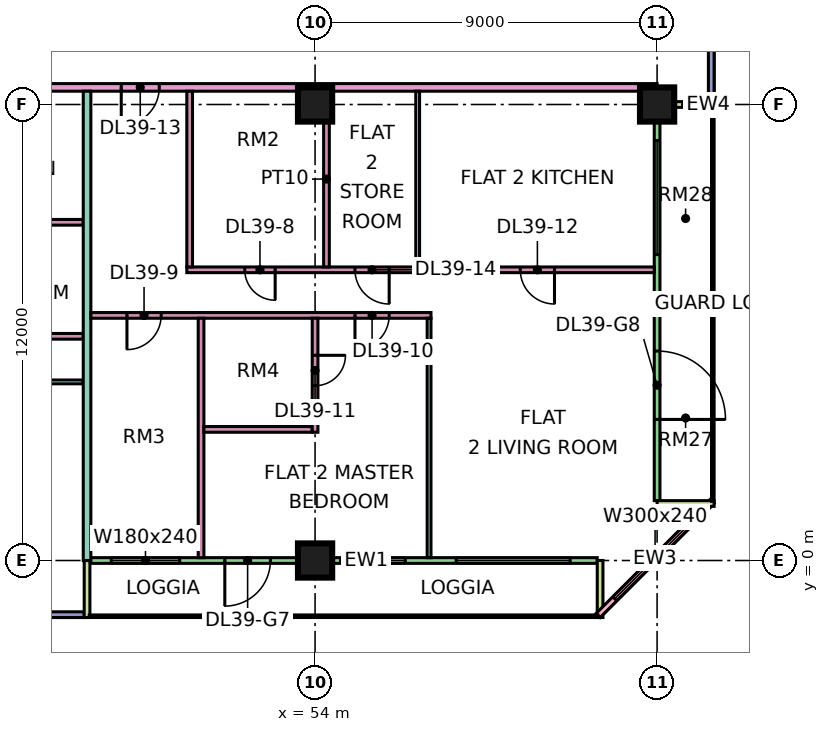
"""IFC4 building model, lengths in metres.
Left out: names, types, materials, properties, quantities, classifications, styles, units other than length and angle.
Written with IfcOpenShell. Run it as: python <this file> out.ifc"""

import sys

from ifc_helpers import new_model, si_unit, direction, frame, frame_2d, origin, origin_2d, place, context, subcontext, project, spatial, rectangle, extrude, element, fill, save


model = new_model("IFC4")
c1 = context("Model", 3, precision=1e-05, world=origin(), true_north=direction((0.0, 1.0)))
c2 = subcontext(c1, "Body", "Model", "MODEL_VIEW")
j1 = project(units=[si_unit("LENGTHUNIT", "METRE"), si_unit("PLANEANGLEUNIT", "RADIAN")], contexts=[c1])
p1 = place(None, origin())
s1 = spatial("IfcSite", under=j1, at=p1, CompositionType="ELEMENT")
p2 = place(p1, origin())
s2 = spatial("IfcBuilding", under=s1, at=p2, CompositionType="ELEMENT")
p3 = place(p2, frame((0.0, 0.0, 172.4)))
s3 = spatial("IfcBuildingStorey", under=s2, at=p3, CompositionType="ELEMENT", Elevation=172.4)
for number, where, z_axis, x_axis in (
    (1, (54.0, 0.0, 0.0), (0.0, 0.0, 1.0), (1.0, 0.0, 0.0)),
    (2, (54.0, 12.0, 0.0), (0.0, 0.0, 1.0), (1.0, 0.0, 0.0)),
    (3, (63.0, 12.0, 0.0), (0.0, 0.0, 1.0), (1.0, 0.0, 0.0)),
):
    element("IfcColumn", number, at=place(p3, frame(where, z_axis=z_axis, x_axis=x_axis)), inside=s3, PredefinedType="COLUMN", context=c2, shape_type="SweptSolid", body=[
        extrude(rectangle(XDim=0.9, YDim=0.9, at=origin_2d()), origin(), (0.0, 0.0, 1.0), 3.75),
    ])
p4 = place(p3, frame((36.075, -1.425, 0.0), z_axis=(0.0, 0.0, 1.0), x_axis=(1.0, 0.0, 0.0)))
e4 = element("IfcWall", 4, at=p4, inside=s3, PredefinedType="SOLIDWALL", context=c2, shape_type="SweptSolid", body=[
    extrude(rectangle(XDim=11.85, YDim=0.15, at=frame_2d((5.925, 0.0))), origin(), (0.0, 0.0, 1.0), 3.35),
])
p5 = place(p4, frame((0.562, 0.0, 0.45)))
e5 = element("IfcOpeningElement", 5, at=p5, cuts=e4, PredefinedType="OPENING", context=c2, shape_type="SweptSolid", body=[
    extrude(rectangle(XDim=1.8, YDim=2.4, at=frame_2d((0.9, 1.2))), frame((0.0, 0.085, 0.0), z_axis=(0.0, -1.0, 0.0), x_axis=(1.0, 0.0, 0.0)), (0.0, 0.0, 1.0), 0.17),
])
p6 = place(p4, frame((5.887, 0.0, 0.45)))
e6 = element("IfcOpeningElement", 6, at=p6, cuts=e4, PredefinedType="OPENING", context=c2, shape_type="SweptSolid", body=[
    extrude(rectangle(XDim=3.0, YDim=2.4, at=frame_2d((1.5, 1.2))), frame((0.0, 0.085, 0.0), z_axis=(0.0, -1.0, 0.0), x_axis=(1.0, 0.0, 0.0)), (0.0, 0.0, 1.0), 0.17),
])
p7 = place(p3, frame((48.075, 0.0, 0.0), z_axis=(0.0, 0.0, 1.0), x_axis=(1.0, 0.0, 0.0)))
e7 = element("IfcWall", 7, at=p7, inside=s3, PredefinedType="SOLIDWALL", context=c2, shape_type="SweptSolid", body=[
    extrude(rectangle(XDim=13.35, YDim=0.15, at=frame_2d((6.675, 0.0))), origin(), (0.0, 0.0, 1.0), 3.35),
])
p8 = place(p7, frame((0.562, 0.0, 0.45)))
e8 = element("IfcOpeningElement", 8, at=p8, cuts=e7, PredefinedType="OPENING", context=c2, shape_type="SweptSolid", body=[
    extrude(rectangle(XDim=1.8, YDim=2.4, at=frame_2d((0.9, 1.2))), frame((0.0, 0.085, 0.0), z_axis=(0.0, -1.0, 0.0), x_axis=(1.0, 0.0, 0.0)), (0.0, 0.0, 1.0), 0.17),
])
p9 = place(p7, frame((3.55, 0.0, 0.0)))
e9 = element("IfcOpeningElement", 9, at=p9, cuts=e7, PredefinedType="OPENING", context=c2, shape_type="SweptSolid", body=[
    extrude(rectangle(XDim=1.2, YDim=2.4, at=frame_2d((0.6, 1.2))), frame((0.0, 0.085, 0.0), z_axis=(0.0, -1.0, 0.0), x_axis=(1.0, 0.0, 0.0)), (0.0, 0.0, 1.0), 0.17),
])
p10 = place(p7, frame((7.1, 0.0, 0.45)))
e10 = element("IfcOpeningElement", 10, at=p10, cuts=e7, PredefinedType="OPENING", context=c2, shape_type="SweptSolid", body=[
    extrude(rectangle(XDim=1.2, YDim=2.4, at=frame_2d((0.6, 1.2))), frame((0.0, 0.085, 0.0), z_axis=(0.0, -1.0, 0.0), x_axis=(1.0, 0.0, 0.0)), (0.0, 0.0, 1.0), 0.17),
])
p11 = place(p7, frame((9.637, 0.0, 0.45)))
e11 = element("IfcOpeningElement", 11, at=p11, cuts=e7, PredefinedType="OPENING", context=c2, shape_type="SweptSolid", body=[
    extrude(rectangle(XDim=3.0, YDim=2.4, at=frame_2d((1.5, 1.2))), frame((0.0, 0.085, 0.0), z_axis=(0.0, -1.0, 0.0), x_axis=(1.0, 0.0, 0.0)), (0.0, 0.0, 1.0), 0.17),
])
for number, where, z_axis, x_axis in (
    (12, (48.0, -1.5, 0.0), (0.0, 0.0, 1.0), (0.0, 1.0, 0.0)),
    (13, (61.5, -1.5, 0.0), (0.0, 0.0, 1.0), (0.0, 1.0, 0.0)),
):
    element("IfcWall", number, at=place(p3, frame(where, z_axis=z_axis, x_axis=x_axis)), inside=s3, PredefinedType="SOLIDWALL", context=c2, shape_type="SweptSolid", body=[
        extrude(rectangle(XDim=1.5, YDim=0.15, at=frame_2d((0.75, 0.0))), origin(), (0.0, 0.0, 1.0), 3.35),
    ])
p12 = place(p3, frame((61.447, -1.447, 0.0), z_axis=(0.0, 0.0, 1.0), x_axis=(0.707106781187, 0.707106781187, 0.0)))
e14 = element("IfcWall", 14, at=p12, inside=s3, PredefinedType="SOLIDWALL", context=c2, shape_type="SweptSolid", body=[
    extrude(rectangle(XDim=4.243, YDim=0.15, at=frame_2d((2.121, 0.0))), origin(), (0.0, 0.0, 1.0), 3.35),
])
p13 = place(p12, frame((0.621, 0.0, 0.45)))
e15 = element("IfcOpeningElement", 15, at=p13, cuts=e14, PredefinedType="OPENING", context=c2, shape_type="SweptSolid", body=[
    extrude(rectangle(XDim=3.0, YDim=2.4, at=frame_2d((1.5, 1.2))), frame((0.0, 0.085, 0.0), z_axis=(0.0, -1.0, 0.0), x_axis=(1.0, 0.0, 0.0)), (0.0, 0.0, 1.0), 0.17),
])
p14 = place(p3, frame((63.0, 1.575, 0.0), z_axis=(0.0, 0.0, 1.0), x_axis=(0.0, 1.0, 0.0)))
e16 = element("IfcWall", 16, at=p14, inside=s3, PredefinedType="SOLIDWALL", context=c2, shape_type="SweptSolid", body=[
    extrude(rectangle(XDim=10.35, YDim=0.15, at=frame_2d((5.175, 0.0))), origin(), (0.0, 0.0, 1.0), 3.35),
])
p15 = place(p14, frame((2.137, 0.0, 0.0)))
e17 = element("IfcOpeningElement", 17, at=p15, cuts=e16, PredefinedType="OPENING", context=c2, shape_type="SweptSolid", body=[
    extrude(rectangle(XDim=1.8, YDim=2.4, at=frame_2d((0.9, 1.2))), frame((0.0, 0.085, 0.0), z_axis=(0.0, -1.0, 0.0), x_axis=(1.0, 0.0, 0.0)), (0.0, 0.0, 1.0), 0.17),
])
p16 = place(p14, frame((6.475, 0.0, 0.45)))
e18 = element("IfcOpeningElement", 18, at=p16, cuts=e16, PredefinedType="OPENING", context=c2, shape_type="SweptSolid", body=[
    extrude(rectangle(XDim=3.0, YDim=2.4, at=frame_2d((1.5, 1.2))), frame((0.0, 0.085, 0.0), z_axis=(0.0, -1.0, 0.0), x_axis=(1.0, 0.0, 0.0)), (0.0, 0.0, 1.0), 0.17),
])
for number, where, z_axis, x_axis in (
    (19, (64.5, 1.5, 0.0), (0.0, 0.0, 1.0), (-1.0, 0.0, 0.0)),
    (20, (64.5, 12.0, 0.0), (0.0, 0.0, 1.0), (-1.0, 0.0, 0.0)),
):
    element("IfcWall", number, at=place(p3, frame(where, z_axis=z_axis, x_axis=x_axis)), inside=s3, PredefinedType="SOLIDWALL", context=c2, shape_type="SweptSolid", body=[
        extrude(rectangle(XDim=1.5, YDim=0.15, at=frame_2d((0.75, 0.0))), origin(), (0.0, 0.0, 1.0), 3.35),
    ])
p17 = place(p3, frame((64.425, 12.075, 0.0), z_axis=(0.0, 0.0, 1.0), x_axis=(0.0, 1.0, 0.0)))
e21 = element("IfcWall", 21, at=p17, inside=s3, PredefinedType="SOLIDWALL", context=c2, shape_type="SweptSolid", body=[
    extrude(rectangle(XDim=10.425, YDim=0.15, at=frame_2d((5.212, 0.0))), origin(), (0.0, 0.0, 1.0), 3.35),
])
p18 = place(p17, frame((6.375, 0.0, 0.45)))
e22 = element("IfcOpeningElement", 22, at=p18, cuts=e21, PredefinedType="OPENING", context=c2, shape_type="SweptSolid", body=[
    extrude(rectangle(XDim=0.9, YDim=2.4, at=frame_2d((0.45, 1.2))), frame((0.0, 0.085, 0.0), z_axis=(0.0, -1.0, 0.0), x_axis=(1.0, 0.0, 0.0)), (0.0, 0.0, 1.0), 0.17),
])
p19 = place(p17, frame((8.175, 0.0, 0.45)))
e23 = element("IfcOpeningElement", 23, at=p19, cuts=e21, PredefinedType="OPENING", context=c2, shape_type="SweptSolid", body=[
    extrude(rectangle(XDim=1.8, YDim=2.4, at=frame_2d((0.9, 1.2))), frame((0.0, 0.085, 0.0), z_axis=(0.0, -1.0, 0.0), x_axis=(1.0, 0.0, 0.0)), (0.0, 0.0, 1.0), 0.17),
])
p20 = place(p3, frame((33.05, 4.7, 0.0), z_axis=(0.0, 0.0, 1.0), x_axis=(1.0, 0.0, 0.0)))
e24 = element("IfcWall", 24, at=p20, inside=s3, PredefinedType="PARTITIONING", context=c2, shape_type="SweptSolid", body=[
    extrude(rectangle(XDim=14.85, YDim=0.1, at=frame_2d((7.425, 0.0))), origin(), (0.0, 0.0, 1.0), 3.35),
])
p21 = place(p20, frame((1.0, 0.0, 0.0)))
e25 = element("IfcOpeningElement", 25, at=p21, cuts=e24, PredefinedType="OPENING", context=c2, shape_type="SweptSolid", body=[
    extrude(rectangle(XDim=0.9, YDim=2.1, at=frame_2d((0.45, 1.05))), frame((0.0, 0.06, 0.0), z_axis=(0.0, -1.0, 0.0), x_axis=(1.0, 0.0, 0.0)), (0.0, 0.0, 1.0), 0.12),
])
p22 = place(p20, frame((4.0, 0.0, 0.0)))
e26 = element("IfcOpeningElement", 26, at=p22, cuts=e24, PredefinedType="OPENING", context=c2, shape_type="SweptSolid", body=[
    extrude(rectangle(XDim=0.9, YDim=2.1, at=frame_2d((0.45, 1.05))), frame((0.0, 0.06, 0.0), z_axis=(0.0, -1.0, 0.0), x_axis=(1.0, 0.0, 0.0)), (0.0, 0.0, 1.0), 0.12),
])
p23 = place(p20, frame((10.0, 0.0, 0.0)))
e27 = element("IfcOpeningElement", 27, at=p23, cuts=e24, PredefinedType="OPENING", context=c2, shape_type="SweptSolid", body=[
    extrude(rectangle(XDim=0.9, YDim=2.1, at=frame_2d((0.45, 1.05))), frame((0.0, 0.06, 0.0), z_axis=(0.0, -1.0, 0.0), x_axis=(1.0, 0.0, 0.0)), (0.0, 0.0, 1.0), 0.12),
])
p24 = place(p3, frame((40.65, 12.45, 0.0), z_axis=(0.0, 0.0, 1.0), x_axis=(1.0, 0.0, 0.0)))
e28 = element("IfcWall", 28, at=p24, inside=s3, PredefinedType="PARTITIONING", context=c2, shape_type="SweptSolid", body=[
    extrude(rectangle(XDim=22.35, YDim=0.2, at=frame_2d((11.175, 0.0))), origin(), (0.0, 0.0, 1.0), 3.35),
])
p25 = place(p24, frame((8.25, 0.0, 0.0)))
e29 = element("IfcOpeningElement", 29, at=p25, cuts=e28, PredefinedType="OPENING", context=c2, shape_type="SweptSolid", body=[
    extrude(rectangle(XDim=1.0, YDim=2.1, at=frame_2d((0.5, 1.05))), frame((0.0, 0.11, 0.0), z_axis=(0.0, -1.0, 0.0), x_axis=(1.0, 0.0, 0.0)), (0.0, 0.0, 1.0), 0.22),
])
p26 = place(p24, frame((1.05, 0.0, 0.0)))
e30 = element("IfcOpeningElement", 30, at=p26, cuts=e28, PredefinedType="OPENING", context=c2, shape_type="SweptSolid", body=[
    extrude(rectangle(XDim=1.0, YDim=2.1, at=frame_2d((0.5, 1.05))), frame((0.0, 0.11, 0.0), z_axis=(0.0, -1.0, 0.0), x_axis=(1.0, 0.0, 0.0)), (0.0, 0.0, 1.0), 0.22),
])
p27 = place(p3, frame((43.725, 5.9, 0.0), z_axis=(0.0, 0.0, 1.0), x_axis=(1.0, 0.0, 0.0)))
e31 = element("IfcWall", 31, at=p27, inside=s3, PredefinedType="PARTITIONING", context=c2, shape_type="SweptSolid", body=[
    extrude(rectangle(XDim=4.175, YDim=0.15, at=frame_2d((2.087, 0.0))), origin(), (0.0, 0.0, 1.0), 3.35),
])
p28 = place(p27, frame((1.675, 0.0, 0.0)))
e32 = element("IfcOpeningElement", 32, at=p28, cuts=e31, PredefinedType="OPENING", context=c2, shape_type="SweptSolid", body=[
    extrude(rectangle(XDim=0.8, YDim=2.1, at=frame_2d((0.4, 1.05))), frame((0.0, 0.085, 0.0), z_axis=(0.0, -1.0, 0.0), x_axis=(1.0, 0.0, 0.0)), (0.0, 0.0, 1.0), 0.17),
])
p29 = place(p3, frame((43.725, 8.9, 0.0), z_axis=(0.0, 0.0, 1.0), x_axis=(1.0, 0.0, 0.0)))
e33 = element("IfcWall", 33, at=p29, inside=s3, PredefinedType="PARTITIONING", context=c2, shape_type="SweptSolid", body=[
    extrude(rectangle(XDim=4.175, YDim=0.15, at=frame_2d((2.087, 0.0))), origin(), (0.0, 0.0, 1.0), 3.35),
])
p30 = place(p3, frame((48.0, 0.0, 0.0), z_axis=(0.0, 0.0, 1.0), x_axis=(0.0, 1.0, 0.0)))
e34 = element("IfcWall", 34, at=p30, inside=s3, PredefinedType="PARTITIONING", context=c2, shape_type="SweptSolid", body=[
    extrude(rectangle(XDim=12.35, YDim=0.2, at=frame_2d((6.175, 0.0))), origin(), (0.0, 0.0, 1.0), 3.35),
])
p31 = place(p3, frame((48.1, 6.45, 0.0), z_axis=(0.0, 0.0, 1.0), x_axis=(1.0, 0.0, 0.0)))
e35 = element("IfcWall", 35, at=p31, inside=s3, PredefinedType="PARTITIONING", context=c2, shape_type="SweptSolid", body=[
    extrude(rectangle(XDim=8.95, YDim=0.15, at=frame_2d((4.475, 0.0))), origin(), (0.0, 0.0, 1.0), 3.35),
])
p32 = place(p31, frame((0.95, 0.0, 0.0)))
e36 = element("IfcOpeningElement", 36, at=p32, cuts=e35, PredefinedType="OPENING", context=c2, shape_type="SweptSolid", body=[
    extrude(rectangle(XDim=0.9, YDim=2.1, at=frame_2d((0.45, 1.05))), frame((0.0, 0.085, 0.0), z_axis=(0.0, -1.0, 0.0), x_axis=(1.0, 0.0, 0.0)), (0.0, 0.0, 1.0), 0.17),
])
p33 = place(p31, frame((6.95, 0.0, 0.0)))
e37 = element("IfcOpeningElement", 37, at=p33, cuts=e35, PredefinedType="OPENING", context=c2, shape_type="SweptSolid", body=[
    extrude(rectangle(XDim=0.9, YDim=2.1, at=frame_2d((0.45, 1.05))), frame((0.0, 0.085, 0.0), z_axis=(0.0, -1.0, 0.0), x_axis=(1.0, 0.0, 0.0)), (0.0, 0.0, 1.0), 0.17),
])
p34 = place(p3, frame((50.625, 7.65, 0.0), z_axis=(0.0, 0.0, 1.0), x_axis=(1.0, 0.0, 0.0)))
e38 = element("IfcWall", 38, at=p34, inside=s3, PredefinedType="PARTITIONING", context=c2, shape_type="SweptSolid", body=[
    extrude(rectangle(XDim=12.301, YDim=0.15, at=frame_2d((6.15, 0.0))), origin(), (0.0, 0.0, 1.0), 3.35),
])
p35 = place(p34, frame((1.525, 0.0, 0.0)))
e39 = element("IfcOpeningElement", 39, at=p35, cuts=e38, PredefinedType="OPENING", context=c2, shape_type="SweptSolid", body=[
    extrude(rectangle(XDim=0.8, YDim=2.1, at=frame_2d((0.4, 1.05))), frame((0.0, 0.085, 0.0), z_axis=(0.0, -1.0, 0.0), x_axis=(1.0, 0.0, 0.0)), (0.0, 0.0, 1.0), 0.17),
])
p36 = place(p34, frame((8.775, 0.0, 0.0)))
e40 = element("IfcOpeningElement", 40, at=p36, cuts=e38, PredefinedType="OPENING", context=c2, shape_type="SweptSolid", body=[
    extrude(rectangle(XDim=0.9, YDim=2.1, at=frame_2d((0.45, 1.05))), frame((0.0, 0.085, 0.0), z_axis=(0.0, -1.0, 0.0), x_axis=(1.0, 0.0, 0.0)), (0.0, 0.0, 1.0), 0.17),
])
p37 = place(p34, frame((4.425, 0.0, 0.0)))
e41 = element("IfcOpeningElement", 41, at=p37, cuts=e38, PredefinedType="OPENING", context=c2, shape_type="SweptSolid", body=[
    extrude(rectangle(XDim=0.9, YDim=2.1, at=frame_2d((0.45, 1.05))), frame((0.0, 0.085, 0.0), z_axis=(0.0, -1.0, 0.0), x_axis=(1.0, 0.0, 0.0)), (0.0, 0.0, 1.0), 0.17),
])
p38 = place(p3, frame((50.7, 7.725, 0.0), z_axis=(0.0, 0.0, 1.0), x_axis=(0.0, 1.0, 0.0)))
e42 = element("IfcWall", 42, at=p38, inside=s3, PredefinedType="PARTITIONING", context=c2, shape_type="SweptSolid", body=[
    extrude(rectangle(XDim=4.625, YDim=0.15, at=frame_2d((2.312, 0.0))), origin(), (0.0, 0.0, 1.0), 3.35),
])
p39 = place(p3, frame((51.0, 0.074, 0.0), z_axis=(0.0, 0.0, 1.0), x_axis=(0.0, 1.0, 0.0)))
e43 = element("IfcWall", 43, at=p39, inside=s3, PredefinedType="PARTITIONING", context=c2, shape_type="SweptSolid", body=[
    extrude(rectangle(XDim=6.301, YDim=0.15, at=frame_2d((3.15, 0.0))), origin(), (0.0, 0.0, 1.0), 3.35),
])
p40 = place(p3, frame((51.075, 3.45, 0.0), z_axis=(0.0, 0.0, 1.0), x_axis=(1.0, 0.0, 0.0)))
e44 = element("IfcWall", 44, at=p40, inside=s3, PredefinedType="PARTITIONING", context=c2, shape_type="SweptSolid", body=[
    extrude(rectangle(XDim=2.85, YDim=0.15, at=frame_2d((1.425, 0.0))), origin(), (0.0, 0.0, 1.0), 3.35),
])
p41 = place(p3, frame((54.0, 3.375, 0.0), z_axis=(0.0, 0.0, 1.0), x_axis=(0.0, 1.0, 0.0)))
e45 = element("IfcWall", 45, at=p41, inside=s3, PredefinedType="PARTITIONING", context=c2, shape_type="SweptSolid", body=[
    extrude(rectangle(XDim=3.0, YDim=0.15, at=frame_2d((1.5, 0.0))), origin(), (0.0, 0.0, 1.0), 3.35),
])
p42 = place(p41, frame((1.225, 0.0, 0.0)))
e46 = element("IfcOpeningElement", 46, at=p42, cuts=e45, PredefinedType="OPENING", context=c2, shape_type="SweptSolid", body=[
    extrude(rectangle(XDim=0.8, YDim=2.1, at=frame_2d((0.4, 1.05))), frame((0.0, 0.085, 0.0), z_axis=(0.0, -1.0, 0.0), x_axis=(1.0, 0.0, 0.0)), (0.0, 0.0, 1.0), 0.17),
])
p43 = place(p3, frame((54.3, 7.725, 0.0), z_axis=(0.0, 0.0, 1.0), x_axis=(0.0, 1.0, 0.0)))
e47 = element("IfcWall", 47, at=p43, inside=s3, PredefinedType="PARTITIONING", context=c2, shape_type="SweptSolid", body=[
    extrude(rectangle(XDim=4.625, YDim=0.15, at=frame_2d((2.312, 0.0))), origin(), (0.0, 0.0, 1.0), 3.35),
])
p44 = place(p3, frame((56.7, 7.725, 0.0), z_axis=(0.0, 0.0, 1.0), x_axis=(0.0, 1.0, 0.0)))
e48 = element("IfcWall", 48, at=p44, inside=s3, PredefinedType="PARTITIONING", context=c2, shape_type="SweptSolid", body=[
    extrude(rectangle(XDim=4.625, YDim=0.1, at=frame_2d((2.312, 0.0))), origin(), (0.0, 0.0, 1.0), 3.35),
])
p45 = place(p3, frame((57.0, 0.074, 0.0), z_axis=(0.0, 0.0, 1.0), x_axis=(0.0, 1.0, 0.0)))
e49 = element("IfcWall", 49, at=p45, inside=s3, PredefinedType="PARTITIONING", context=c2, shape_type="SweptSolid", body=[
    extrude(rectangle(XDim=6.301, YDim=0.1, at=frame_2d((3.15, 0.0))), origin(), (0.0, 0.0, 1.0), 3.35),
])
p46 = place(p8, origin())
e50 = element("IfcWindow", 50, at=p46, inside=s3, PartitioningType="SINGLE_PANEL", PredefinedType="WINDOW", context=c2, shape_type="SweptSolid", body=[
    extrude(rectangle(XDim=1.8, YDim=2.4, at=frame_2d((0.9, 1.2))), frame((0.0, 0.03, 0.0), z_axis=(0.0, -1.0, 0.0), x_axis=(1.0, 0.0, 0.0)), (0.0, 0.0, 1.0), 0.06),
])
fill(e8, e50)
p47 = place(p9, frame((1.2, 0.0, 0.0), z_axis=(0.0, 0.0, 1.0), x_axis=(-1.0, 0.0, 0.0)))
e51 = element("IfcDoor", 51, at=p47, inside=s3, OperationType="DOUBLE_DOOR_SINGLE_SWING", PredefinedType="DOOR", context=c2, shape_type="SweptSolid", body=[
    extrude(rectangle(XDim=1.2, YDim=2.4, at=frame_2d((0.6, 1.2))), frame((0.0, 0.025, 0.0), z_axis=(0.0, -1.0, 0.0), x_axis=(1.0, 0.0, 0.0)), (0.0, 0.0, 1.0), 0.05),
])
fill(e9, e51)
p48 = place(p10, origin())
e52 = element("IfcWindow", 52, at=p48, inside=s3, PartitioningType="SINGLE_PANEL", PredefinedType="WINDOW", context=c2, shape_type="SweptSolid", body=[
    extrude(rectangle(XDim=1.2, YDim=2.4, at=frame_2d((0.6, 1.2))), frame((0.0, 0.03, 0.0), z_axis=(0.0, -1.0, 0.0), x_axis=(1.0, 0.0, 0.0)), (0.0, 0.0, 1.0), 0.06),
])
fill(e10, e52)
p49 = place(p11, origin())
e53 = element("IfcWindow", 53, at=p49, inside=s3, PartitioningType="SINGLE_PANEL", PredefinedType="WINDOW", context=c2, shape_type="SweptSolid", body=[
    extrude(rectangle(XDim=3.0, YDim=2.4, at=frame_2d((1.5, 1.2))), frame((0.0, 0.03, 0.0), z_axis=(0.0, -1.0, 0.0), x_axis=(1.0, 0.0, 0.0)), (0.0, 0.0, 1.0), 0.06),
])
fill(e11, e53)
p50 = place(p13, origin())
e54 = element("IfcWindow", 54, at=p50, inside=s3, PartitioningType="SINGLE_PANEL", PredefinedType="WINDOW", context=c2, shape_type="SweptSolid", body=[
    extrude(rectangle(XDim=3.0, YDim=2.4, at=frame_2d((1.5, 1.2))), frame((0.0, 0.03, 0.0), z_axis=(0.0, -1.0, 0.0), x_axis=(1.0, 0.0, 0.0)), (0.0, 0.0, 1.0), 0.06),
])
fill(e15, e54)
p51 = place(p15, frame((1.8, 0.0, 0.0), z_axis=(0.0, 0.0, 1.0), x_axis=(-1.0, 0.0, 0.0)))
e55 = element("IfcDoor", 55, at=p51, inside=s3, OperationType="DOUBLE_DOOR_SINGLE_SWING", PredefinedType="DOOR", context=c2, shape_type="SweptSolid", body=[
    extrude(rectangle(XDim=1.8, YDim=2.4, at=frame_2d((0.9, 1.2))), frame((0.0, 0.025, 0.0), z_axis=(0.0, -1.0, 0.0), x_axis=(1.0, 0.0, 0.0)), (0.0, 0.0, 1.0), 0.05),
])
fill(e17, e55)
p52 = place(p16, origin())
e56 = element("IfcWindow", 56, at=p52, inside=s3, PartitioningType="SINGLE_PANEL", PredefinedType="WINDOW", context=c2, shape_type="SweptSolid", body=[
    extrude(rectangle(XDim=3.0, YDim=2.4, at=frame_2d((1.5, 1.2))), frame((0.0, 0.03, 0.0), z_axis=(0.0, -1.0, 0.0), x_axis=(1.0, 0.0, 0.0)), (0.0, 0.0, 1.0), 0.06),
])
fill(e18, e56)
p53 = place(p35, origin())
e57 = element("IfcDoor", 57, at=p53, inside=s3, OperationType="SINGLE_SWING_RIGHT", PredefinedType="DOOR", context=c2, shape_type="SweptSolid", body=[
    extrude(rectangle(XDim=0.8, YDim=2.1, at=frame_2d((0.4, 1.05))), frame((0.0, 0.025, 0.0), z_axis=(0.0, -1.0, 0.0), x_axis=(1.0, 0.0, 0.0)), (0.0, 0.0, 1.0), 0.05),
])
fill(e39, e57)
p54 = place(p32, frame((0.9, 0.0, 0.0), z_axis=(0.0, 0.0, 1.0), x_axis=(-1.0, 0.0, 0.0)))
e58 = element("IfcDoor", 58, at=p54, inside=s3, OperationType="SINGLE_SWING_LEFT", PredefinedType="DOOR", context=c2, shape_type="SweptSolid", body=[
    extrude(rectangle(XDim=0.9, YDim=2.1, at=frame_2d((0.45, 1.05))), frame((0.0, 0.025, 0.0), z_axis=(0.0, -1.0, 0.0), x_axis=(1.0, 0.0, 0.0)), (0.0, 0.0, 1.0), 0.05),
])
fill(e36, e58)
p55 = place(p33, frame((0.9, 0.0, 0.0), z_axis=(0.0, 0.0, 1.0), x_axis=(-1.0, 0.0, 0.0)))
e59 = element("IfcDoor", 59, at=p55, inside=s3, OperationType="SINGLE_SWING_LEFT", PredefinedType="DOOR", context=c2, shape_type="SweptSolid", body=[
    extrude(rectangle(XDim=0.9, YDim=2.1, at=frame_2d((0.45, 1.05))), frame((0.0, 0.025, 0.0), z_axis=(0.0, -1.0, 0.0), x_axis=(1.0, 0.0, 0.0)), (0.0, 0.0, 1.0), 0.05),
])
fill(e37, e59)
p56 = place(p42, origin())
e60 = element("IfcDoor", 60, at=p56, inside=s3, OperationType="SINGLE_SWING_RIGHT", PredefinedType="DOOR", context=c2, shape_type="SweptSolid", body=[
    extrude(rectangle(XDim=0.8, YDim=2.1, at=frame_2d((0.4, 1.05))), frame((0.0, 0.025, 0.0), z_axis=(0.0, -1.0, 0.0), x_axis=(1.0, 0.0, 0.0)), (0.0, 0.0, 1.0), 0.05),
])
fill(e46, e60)
p57 = place(p36, origin())
e61 = element("IfcDoor", 61, at=p57, inside=s3, OperationType="SINGLE_SWING_RIGHT", PredefinedType="DOOR", context=c2, shape_type="SweptSolid", body=[
    extrude(rectangle(XDim=0.9, YDim=2.1, at=frame_2d((0.45, 1.05))), frame((0.0, 0.025, 0.0), z_axis=(0.0, -1.0, 0.0), x_axis=(1.0, 0.0, 0.0)), (0.0, 0.0, 1.0), 0.05),
])
fill(e40, e61)
p58 = place(p25, frame((1.0, 0.0, 0.0), z_axis=(0.0, 0.0, 1.0), x_axis=(-1.0, 0.0, 0.0)))
e62 = element("IfcDoor", 62, at=p58, inside=s3, OperationType="SINGLE_SWING_LEFT", PredefinedType="DOOR", context=c2, shape_type="SweptSolid", body=[
    extrude(rectangle(XDim=1.0, YDim=2.1, at=frame_2d((0.5, 1.05))), frame((0.0, 0.025, 0.0), z_axis=(0.0, -1.0, 0.0), x_axis=(1.0, 0.0, 0.0)), (0.0, 0.0, 1.0), 0.05),
])
fill(e29, e62)
p59 = place(p37, origin())
e63 = element("IfcDoor", 63, at=p59, inside=s3, OperationType="SINGLE_SWING_RIGHT", PredefinedType="DOOR", context=c2, shape_type="SweptSolid", body=[
    extrude(rectangle(XDim=0.9, YDim=2.1, at=frame_2d((0.45, 1.05))), frame((0.0, 0.025, 0.0), z_axis=(0.0, -1.0, 0.0), x_axis=(1.0, 0.0, 0.0)), (0.0, 0.0, 1.0), 0.05),
])
fill(e41, e63)
save(model, sys.argv[1])
